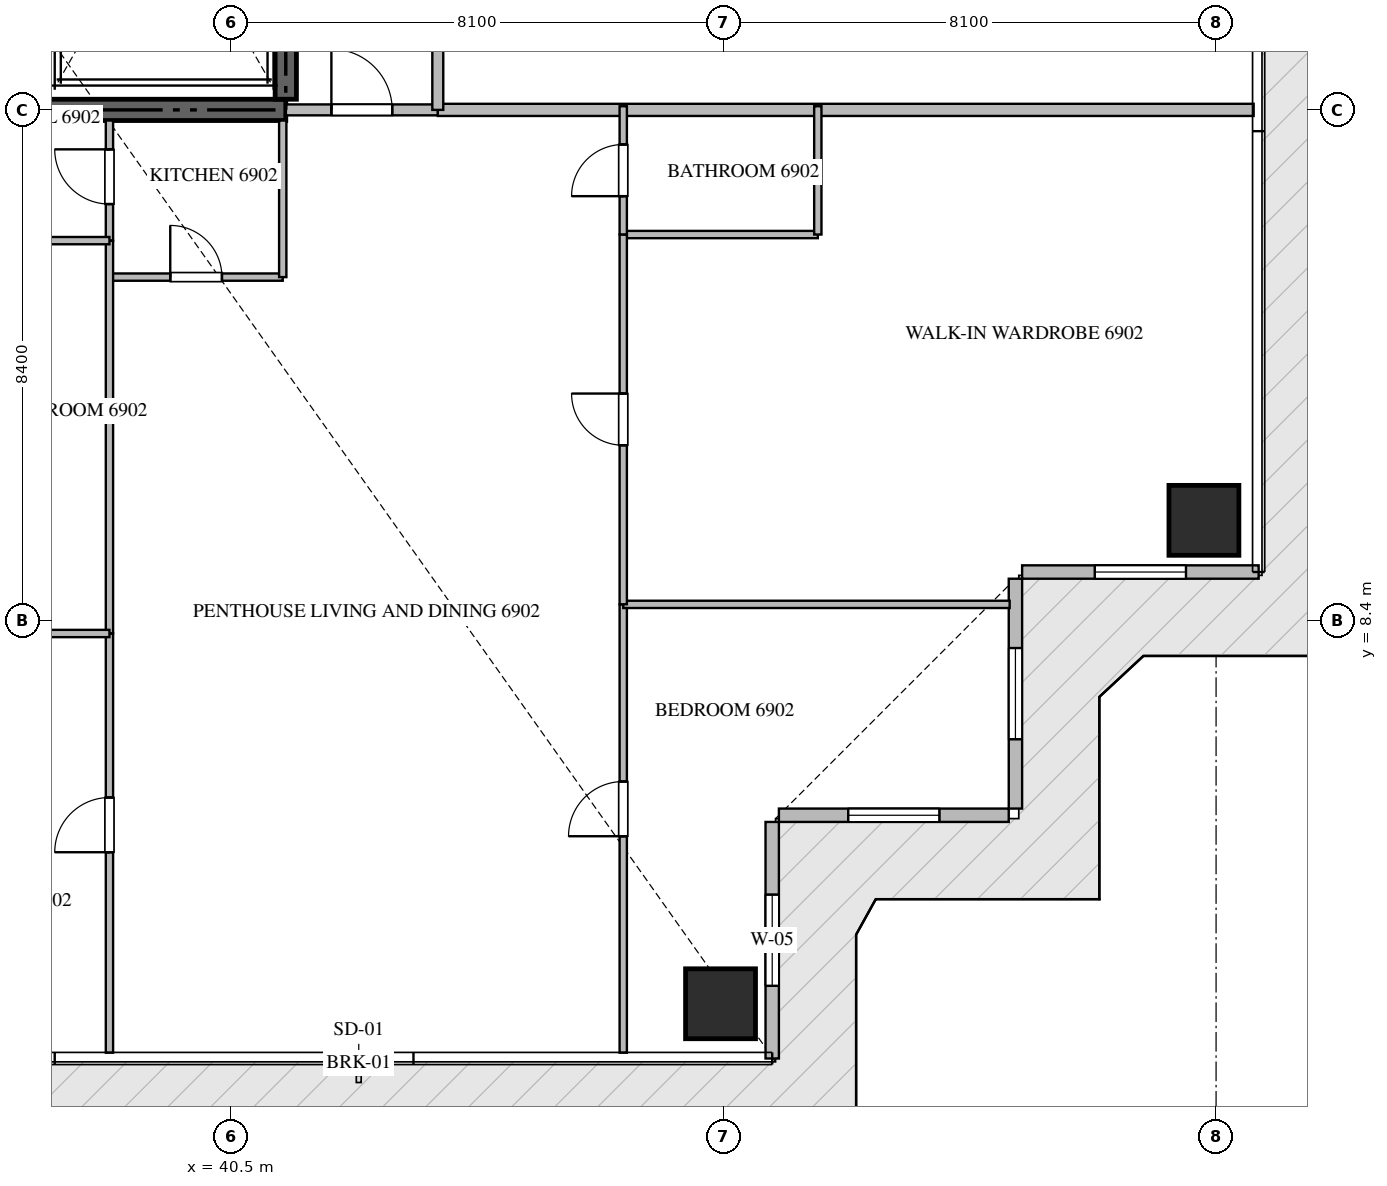
"""IFC4 building model, lengths in metres.
Left out: names, types, materials, properties, quantities, classifications, styles, units other than length and angle.
Written with IfcOpenShell. Run it as: python <this file> out.ifc"""

import sys

from ifc_helpers import new_model, si_unit, direction, frame, frame_2d, origin, origin_2d, place, context, subcontext, project, spatial, rectangle, extrude, source, transform, mapped, element, fill, save


model = new_model("IFC4")
c1 = context("Model", 3, precision=1e-05, world=origin(), true_north=direction((0.0, 1.0)))
c2 = subcontext(c1, "Body", "Model", "MODEL_VIEW")
j1 = project(units=[si_unit("LENGTHUNIT", "METRE"), si_unit("PLANEANGLEUNIT", "RADIAN")], contexts=[c1])
p1 = place(None, origin())
s1 = spatial("IfcSite", under=j1, at=p1, CompositionType="ELEMENT")
p2 = place(p1, origin())
s2 = spatial("IfcBuilding", under=s1, at=p2, CompositionType="ELEMENT")
p3 = place(p2, frame((0.0, 0.0, 275.9)))
s3 = spatial("IfcBuildingStorey", under=s2, at=p3, CompositionType="ELEMENT", Elevation=275.9)
p4 = place(p3, frame((23.4, 16.8, -0.26), z_axis=(0.0, 0.0, 1.0), x_axis=(1.0, 0.0, 0.0)))
e1 = element("IfcWall", 1, at=p4, inside=s3, PredefinedType="SHEAR", context=c2, shape_type="SweptSolid", body=[
    extrude(rectangle(XDim=18.0, YDim=0.35, at=frame_2d((9.0, 0.0))), origin(), (0.0, 0.0, 1.0), 3.848),
])
p5 = place(p3, frame((41.4, 16.975, -0.26), z_axis=(0.0, 0.0, 1.0), x_axis=(0.0, 1.0, 0.0)))
e2 = element("IfcWall", 2, at=p5, inside=s3, PredefinedType="SHEAR", context=c2, shape_type="SweptSolid", body=[
    extrude(rectangle(XDim=8.375, YDim=0.35, at=frame_2d((4.188, 0.0))), origin(), (0.0, 0.0, 1.0), 3.848),
])
m1 = source(origin(), c2, "Body", "SweptSolid", [
    extrude(rectangle(XDim=1.15, YDim=1.15, at=origin_2d()), origin(), (0.0, 0.0, 1.0), 3.85),
])
for number, where, z_axis, x_axis in (
    (3, (48.55, 2.1, -0.26), (0.0, 0.0, 1.0), (1.0, 0.0, 0.0)),
    (4, (56.5, 10.05, -0.26), (0.0, 0.0, 1.0), (1.0, 0.0, 0.0)),
):
    element("IfcColumn", number, at=place(p3, frame(where, z_axis=z_axis, x_axis=x_axis)), inside=s3, PredefinedType="COLUMN", context=c2, shape_type="MappedRepresentation", body=[
        mapped(m1, transform((0.0, 0.0, 0.0), scale=1.0)),
    ])
p6 = place(p3, frame((49.4, 1.2, 0.0), z_axis=(0.0, 0.0, 1.0), x_axis=(0.0, 1.0, 0.0)))
e5 = element("IfcWall", 5, at=p6, inside=s3, PredefinedType="ELEMENTEDWALL", context=c2, shape_type="SweptSolid", body=[
    extrude(rectangle(XDim=3.89, YDim=0.22, at=frame_2d((1.945, 0.0))), origin(), (0.0, 0.0, 1.0), 3.575),
])
p7 = place(p6, frame((1.195, 0.0, 0.65)))
e6 = element("IfcOpeningElement", 6, at=p7, cuts=e5, PredefinedType="OPENING", context=c2, shape_type="SweptSolid", body=[
    extrude(rectangle(XDim=1.5, YDim=2.25, at=frame_2d((0.75, 1.125))), frame((0.0, 0.12, 0.0), z_axis=(0.0, -1.0, 0.0), x_axis=(1.0, 0.0, 0.0)), (0.0, 0.0, 1.0), 0.24),
])
p8 = place(p3, frame((49.51, 5.2, 0.0), z_axis=(0.0, 0.0, 1.0), x_axis=(1.0, 0.0, 0.0)))
e7 = element("IfcWall", 7, at=p8, inside=s3, PredefinedType="ELEMENTEDWALL", context=c2, shape_type="SweptSolid", body=[
    extrude(rectangle(XDim=3.78, YDim=0.22, at=frame_2d((1.89, 0.0))), origin(), (0.0, 0.0, 1.0), 3.575),
])
p9 = place(p8, frame((1.14, 0.0, 0.65)))
e8 = element("IfcOpeningElement", 8, at=p9, cuts=e7, PredefinedType="OPENING", context=c2, shape_type="SweptSolid", body=[
    extrude(rectangle(XDim=1.5, YDim=2.25, at=frame_2d((0.75, 1.125))), frame((0.0, 0.12, 0.0), z_axis=(0.0, -1.0, 0.0), x_axis=(1.0, 0.0, 0.0)), (0.0, 0.0, 1.0), 0.24),
])
p10 = place(p3, frame((53.4, 5.31, 0.0), z_axis=(0.0, 0.0, 1.0), x_axis=(0.0, 1.0, 0.0)))
e9 = element("IfcWall", 9, at=p10, inside=s3, PredefinedType="ELEMENTEDWALL", context=c2, shape_type="SweptSolid", body=[
    extrude(rectangle(XDim=3.78, YDim=0.22, at=frame_2d((1.89, 0.0))), origin(), (0.0, 0.0, 1.0), 3.575),
])
p11 = place(p10, frame((1.14, 0.0, 0.65)))
e10 = element("IfcOpeningElement", 10, at=p11, cuts=e9, PredefinedType="OPENING", context=c2, shape_type="SweptSolid", body=[
    extrude(rectangle(XDim=1.5, YDim=2.25, at=frame_2d((0.75, 1.125))), frame((0.0, 0.12, 0.0), z_axis=(0.0, -1.0, 0.0), x_axis=(1.0, 0.0, 0.0)), (0.0, 0.0, 1.0), 0.24),
])
p12 = place(p3, frame((53.51, 9.2, 0.0), z_axis=(0.0, 0.0, 1.0), x_axis=(1.0, 0.0, 0.0)))
e11 = element("IfcWall", 11, at=p12, inside=s3, PredefinedType="ELEMENTEDWALL", context=c2, shape_type="SweptSolid", body=[
    extrude(rectangle(XDim=3.89, YDim=0.22, at=frame_2d((1.945, 0.0))), origin(), (0.0, 0.0, 1.0), 3.575),
])
p13 = place(p12, frame((1.195, 0.0, 0.65)))
e12 = element("IfcOpeningElement", 12, at=p13, cuts=e11, PredefinedType="OPENING", context=c2, shape_type="SweptSolid", body=[
    extrude(rectangle(XDim=1.5, YDim=2.25, at=frame_2d((0.75, 1.125))), frame((0.0, 0.12, 0.0), z_axis=(0.0, -1.0, 0.0), x_axis=(1.0, 0.0, 0.0)), (0.0, 0.0, 1.0), 0.24),
])
p14 = place(p3, frame((43.9, 16.8, 0.0), z_axis=(0.0, 0.0, 1.0), x_axis=(1.0, 0.0, 0.0)))
e13 = element("IfcWall", 13, at=p14, inside=s3, PredefinedType="PARTITIONING", context=c2, shape_type="SweptSolid", body=[
    extrude(rectangle(XDim=13.418, YDim=0.2, at=frame_2d((6.709, 0.0))), origin(), (0.0, 0.0, 1.0), 3.59),
])
p15 = place(p3, frame((41.402, 16.8, 0.0), z_axis=(0.0, 0.0, 1.0), x_axis=(1.0, 0.0, 0.0)))
e14 = element("IfcWall", 14, at=p15, inside=s3, PredefinedType="PARTITIONING", context=c2, shape_type="SweptSolid", body=[
    extrude(rectangle(XDim=2.496, YDim=0.18, at=frame_2d((1.248, 0.0))), origin(), (0.0, 0.0, 1.0), 3.59),
])
p16 = place(p15, frame((0.748, 0.0, 0.0)))
e15 = element("IfcOpeningElement", 15, at=p16, cuts=e14, PredefinedType="OPENING", context=c2, shape_type="SweptSolid", body=[
    extrude(rectangle(XDim=1.0, YDim=2.15, at=frame_2d((0.5, 1.075))), frame((0.0, 0.1, 0.0), z_axis=(0.0, -1.0, 0.0), x_axis=(1.0, 0.0, 0.0)), (0.0, 0.0, 1.0), 0.2),
])
p17 = place(p3, frame((43.9, 16.8, 0.0), z_axis=(0.0, 0.0, 1.0), x_axis=(0.0, 1.0, 0.0)))
e16 = element("IfcWall", 16, at=p17, inside=s3, PredefinedType="PARTITIONING", context=c2, shape_type="SweptSolid", body=[
    extrude(rectangle(XDim=16.8, YDim=0.18, at=frame_2d((8.4, 0.0))), origin(), (0.0, 0.0, 1.0), 3.59),
])
p18 = place(p17, frame((1.3, 0.0, 0.0)))
e17 = element("IfcOpeningElement", 17, at=p18, cuts=e16, PredefinedType="OPENING", context=c2, shape_type="SweptSolid", body=[
    extrude(rectangle(XDim=1.0, YDim=2.15, at=frame_2d((0.5, 1.075))), frame((0.0, 0.1, 0.0), z_axis=(0.0, -1.0, 0.0), x_axis=(1.0, 0.0, 0.0)), (0.0, 0.0, 1.0), 0.2),
])
p19 = place(p3, frame((38.5, 14.05, 0.0), z_axis=(0.0, 0.0, 1.0), x_axis=(1.0, 0.0, 0.0)))
e18 = element("IfcWall", 18, at=p19, inside=s3, PredefinedType="PARTITIONING", context=c2, shape_type="SweptSolid", body=[
    extrude(rectangle(XDim=2.85, YDim=0.12, at=frame_2d((1.425, 0.0))), origin(), (0.0, 0.0, 1.0), 3.59),
])
p20 = place(p19, frame((1.0, 0.0, 0.0)))
e19 = element("IfcOpeningElement", 19, at=p20, cuts=e18, PredefinedType="OPENING", context=c2, shape_type="SweptSolid", body=[
    extrude(rectangle(XDim=0.85, YDim=2.1, at=frame_2d((0.425, 1.05))), frame((0.0, 0.07, 0.0), z_axis=(0.0, -1.0, 0.0), x_axis=(1.0, 0.0, 0.0)), (0.0, 0.0, 1.0), 0.14),
])
p21 = place(p3, frame((41.35, 14.05, 0.0), z_axis=(0.0, 0.0, 1.0), x_axis=(0.0, 1.0, 0.0)))
e20 = element("IfcWall", 20, at=p21, inside=s3, PredefinedType="PARTITIONING", context=c2, shape_type="SweptSolid", body=[
    extrude(rectangle(XDim=2.575, YDim=0.12, at=frame_2d((1.288, 0.0))), origin(), (0.0, 0.0, 1.0), 3.59),
])
p22 = place(p3, frame((38.5, 14.65, 0.0), z_axis=(0.0, 0.0, 1.0), x_axis=(0.0, 1.0, 0.0)))
e21 = element("IfcWall", 21, at=p22, inside=s3, PredefinedType="PARTITIONING", context=c2, shape_type="SweptSolid", body=[
    extrude(rectangle(XDim=1.975, YDim=0.12, at=frame_2d((0.988, 0.0))), origin(), (0.0, 0.0, 1.0), 3.59),
])
p23 = place(p22, frame((0.601, 0.0, 0.0)))
e22 = element("IfcOpeningElement", 22, at=p23, cuts=e21, PredefinedType="OPENING", context=c2, shape_type="SweptSolid", body=[
    extrude(rectangle(XDim=0.9, YDim=2.1, at=frame_2d((0.45, 1.05))), frame((0.0, 0.07, 0.0), z_axis=(0.0, -1.0, 0.0), x_axis=(1.0, 0.0, 0.0)), (0.0, 0.0, 1.0), 0.14),
])
p24 = place(p3, frame((38.5, 1.295, 0.0), z_axis=(0.0, 0.0, 1.0), x_axis=(0.0, 1.0, 0.0)))
e23 = element("IfcWall", 23, at=p24, inside=s3, PredefinedType="PARTITIONING", context=c2, shape_type="SweptSolid", body=[
    extrude(rectangle(XDim=6.894, YDim=0.12, at=frame_2d((3.447, 0.0))), origin(), (0.0, 0.0, 1.0), 3.59),
])
p25 = place(p24, frame((3.297, 0.0, 0.0)))
e24 = element("IfcOpeningElement", 24, at=p25, cuts=e23, PredefinedType="OPENING", context=c2, shape_type="SweptSolid", body=[
    extrude(rectangle(XDim=0.9, YDim=2.1, at=frame_2d((0.45, 1.05))), frame((0.0, 0.07, 0.0), z_axis=(0.0, -1.0, 0.0), x_axis=(1.0, 0.0, 0.0)), (0.0, 0.0, 1.0), 0.14),
])
p26 = place(p3, frame((38.5, 8.191, 0.0), z_axis=(0.0, 0.0, 1.0), x_axis=(0.0, 1.0, 0.0)))
e25 = element("IfcWall", 25, at=p26, inside=s3, PredefinedType="PARTITIONING", context=c2, shape_type="SweptSolid", body=[
    extrude(rectangle(XDim=6.457, YDim=0.12, at=frame_2d((3.229, 0.0))), origin(), (0.0, 0.0, 1.0), 3.59),
])
p27 = place(p3, frame((33.38, 8.189, 0.0), z_axis=(0.0, 0.0, 1.0), x_axis=(1.0, 0.0, 0.0)))
e26 = element("IfcWall", 26, at=p27, inside=s3, PredefinedType="PARTITIONING", context=c2, shape_type="SweptSolid", body=[
    extrude(rectangle(XDim=5.12, YDim=0.12, at=frame_2d((2.56, 0.0))), origin(), (0.0, 0.0, 1.0), 3.59),
])
p28 = place(p3, frame((35.482, 14.65, 0.0), z_axis=(0.0, 0.0, 1.0), x_axis=(1.0, 0.0, 0.0)))
e27 = element("IfcWall", 27, at=p28, inside=s3, PredefinedType="PARTITIONING", context=c2, shape_type="SweptSolid", body=[
    extrude(rectangle(XDim=3.018, YDim=0.12, at=frame_2d((1.509, 0.0))), origin(), (0.0, 0.0, 1.0), 3.59),
])
p29 = place(p28, frame((1.084, 0.0, 0.0)))
e28 = element("IfcOpeningElement", 28, at=p29, cuts=e27, PredefinedType="OPENING", context=c2, shape_type="SweptSolid", body=[
    extrude(rectangle(XDim=0.85, YDim=2.1, at=frame_2d((0.425, 1.05))), frame((0.0, 0.07, 0.0), z_axis=(0.0, -1.0, 0.0), x_axis=(1.0, 0.0, 0.0)), (0.0, 0.0, 1.0), 0.14),
])
p30 = place(p3, frame((46.95, 1.295, 0.0), z_axis=(0.0, 0.0, 1.0), x_axis=(0.0, 1.0, 0.0)))
e29 = element("IfcWall", 29, at=p30, inside=s3, PredefinedType="PARTITIONING", context=c2, shape_type="SweptSolid", body=[
    extrude(rectangle(XDim=7.373, YDim=0.12, at=frame_2d((3.687, 0.0))), origin(), (0.0, 0.0, 1.0), 3.59),
])
p31 = place(p30, frame((3.56, 0.0, 0.0)))
e30 = element("IfcOpeningElement", 30, at=p31, cuts=e29, PredefinedType="OPENING", context=c2, shape_type="SweptSolid", body=[
    extrude(rectangle(XDim=0.9, YDim=2.1, at=frame_2d((0.45, 1.05))), frame((0.0, 0.07, 0.0), z_axis=(0.0, -1.0, 0.0), x_axis=(1.0, 0.0, 0.0)), (0.0, 0.0, 1.0), 0.14),
])
p32 = place(p3, frame((46.95, 8.668, 0.0), z_axis=(0.0, 0.0, 1.0), x_axis=(1.0, 0.0, 0.0)))
e31 = element("IfcWall", 31, at=p32, inside=s3, PredefinedType="PARTITIONING", context=c2, shape_type="SweptSolid", body=[
    extrude(rectangle(XDim=6.355, YDim=0.12, at=frame_2d((3.177, 0.0))), origin(), (0.0, 0.0, 1.0), 3.59),
])
p33 = place(p3, frame((46.95, 14.75, 0.0), z_axis=(0.0, 0.0, 1.0), x_axis=(1.0, 0.0, 0.0)))
e32 = element("IfcWall", 32, at=p33, inside=s3, PredefinedType="PARTITIONING", context=c2, shape_type="SweptSolid", body=[
    extrude(rectangle(XDim=3.2, YDim=0.12, at=frame_2d((1.6, 0.0))), origin(), (0.0, 0.0, 1.0), 3.59),
])
p34 = place(p3, frame((50.15, 14.75, 0.0), z_axis=(0.0, 0.0, 1.0), x_axis=(0.0, 1.0, 0.0)))
e33 = element("IfcWall", 33, at=p34, inside=s3, PredefinedType="PARTITIONING", context=c2, shape_type="SweptSolid", body=[
    extrude(rectangle(XDim=2.11, YDim=0.12, at=frame_2d((1.055, 0.0))), origin(), (0.0, 0.0, 1.0), 3.59),
])
p35 = place(p3, frame((46.95, 8.67, 0.0), z_axis=(0.0, 0.0, 1.0), x_axis=(0.0, 1.0, 0.0)))
e34 = element("IfcWall", 34, at=p35, inside=s3, PredefinedType="PARTITIONING", context=c2, shape_type="SweptSolid", body=[
    extrude(rectangle(XDim=6.08, YDim=0.12, at=frame_2d((3.04, 0.0))), origin(), (0.0, 0.0, 1.0), 3.59),
])
p36 = place(p35, frame((2.615, 0.0, 0.0)))
e35 = element("IfcOpeningElement", 35, at=p36, cuts=e34, PredefinedType="OPENING", context=c2, shape_type="SweptSolid", body=[
    extrude(rectangle(XDim=0.85, YDim=2.1, at=frame_2d((0.425, 1.05))), frame((0.0, 0.07, 0.0), z_axis=(0.0, -1.0, 0.0), x_axis=(1.0, 0.0, 0.0)), (0.0, 0.0, 1.0), 0.14),
])
p37 = place(p3, frame((46.95, 14.752, 0.0), z_axis=(0.0, 0.0, 1.0), x_axis=(0.0, 1.0, 0.0)))
e36 = element("IfcWall", 36, at=p37, inside=s3, PredefinedType="PARTITIONING", context=c2, shape_type="SweptSolid", body=[
    extrude(rectangle(XDim=2.108, YDim=0.12, at=frame_2d((1.054, 0.0))), origin(), (0.0, 0.0, 1.0), 3.59),
])
p38 = place(p37, frame((0.629, 0.0, 0.0)))
e37 = element("IfcOpeningElement", 37, at=p38, cuts=e36, PredefinedType="OPENING", context=c2, shape_type="SweptSolid", body=[
    extrude(rectangle(XDim=0.85, YDim=2.1, at=frame_2d((0.425, 1.05))), frame((0.0, 0.07, 0.0), z_axis=(0.0, -1.0, 0.0), x_axis=(1.0, 0.0, 0.0)), (0.0, 0.0, 1.0), 0.14),
])
m2 = source(origin(), c2, "Body", "SweptSolid", [
    extrude(rectangle(XDim=1.5, YDim=2.25, at=frame_2d((0.75, 1.125))), frame((0.0, 0.03, 0.0), z_axis=(0.0, -1.0, 0.0), x_axis=(1.0, 0.0, 0.0)), (0.0, 0.0, 1.0), 0.06),
])
p39 = place(p7, origin())
e38 = element("IfcWindow", 38, at=p39, inside=s3, PartitioningType="SINGLE_PANEL", PredefinedType="WINDOW", context=c2, shape_type="MappedRepresentation", body=[
    mapped(m2, transform((0.0, 0.0, 0.0), scale=1.0)),
])
fill(e6, e38)
p40 = place(p9, origin())
e39 = element("IfcWindow", 39, at=p40, inside=s3, PartitioningType="SINGLE_PANEL", PredefinedType="WINDOW", context=c2, shape_type="MappedRepresentation", body=[
    mapped(m2, transform((0.0, 0.0, 0.0), scale=1.0)),
])
fill(e8, e39)
p41 = place(p11, origin())
e40 = element("IfcWindow", 40, at=p41, inside=s3, PartitioningType="SINGLE_PANEL", PredefinedType="WINDOW", context=c2, shape_type="MappedRepresentation", body=[
    mapped(m2, transform((0.0, 0.0, 0.0), scale=1.0)),
])
fill(e10, e40)
p42 = place(p13, origin())
e41 = element("IfcWindow", 41, at=p42, inside=s3, PartitioningType="SINGLE_PANEL", PredefinedType="WINDOW", context=c2, shape_type="MappedRepresentation", body=[
    mapped(m2, transform((0.0, 0.0, 0.0), scale=1.0)),
])
fill(e12, e41)
m3 = source(origin(), c2, "Body", "SweptSolid", [
    extrude(rectangle(XDim=1.0, YDim=2.15, at=frame_2d((0.5, 1.075))), frame((0.0, 0.025, 0.0), z_axis=(0.0, -1.0, 0.0), x_axis=(1.0, 0.0, 0.0)), (0.0, 0.0, 1.0), 0.05),
])
p43 = place(p16, origin())
e42 = element("IfcDoor", 42, at=p43, inside=s3, OperationType="SINGLE_SWING_LEFT", PredefinedType="DOOR", context=c2, shape_type="MappedRepresentation", body=[
    mapped(m3, transform((0.0, 0.0, 0.0), scale=1.0)),
])
fill(e15, e42)
m4 = source(origin(), c2, "Body", "SweptSolid", [
    extrude(rectangle(XDim=0.85, YDim=2.1, at=frame_2d((0.425, 1.05))), frame((0.0, 0.025, 0.0), z_axis=(0.0, -1.0, 0.0), x_axis=(1.0, 0.0, 0.0)), (0.0, 0.0, 1.0), 0.05),
])
p44 = place(p20, origin())
e43 = element("IfcDoor", 43, at=p44, inside=s3, OperationType="SINGLE_SWING_LEFT", PredefinedType="DOOR", context=c2, shape_type="MappedRepresentation", body=[
    mapped(m4, transform((0.0, 0.0, 0.0), scale=1.0)),
])
fill(e19, e43)
m5 = source(origin(), c2, "Body", "SweptSolid", [
    extrude(rectangle(XDim=0.9, YDim=2.1, at=frame_2d((0.45, 1.05))), frame((0.0, 0.025, 0.0), z_axis=(0.0, -1.0, 0.0), x_axis=(1.0, 0.0, 0.0)), (0.0, 0.0, 1.0), 0.05),
])
p45 = place(p23, origin())
e44 = element("IfcDoor", 44, at=p45, inside=s3, OperationType="SINGLE_SWING_RIGHT", PredefinedType="DOOR", context=c2, shape_type="MappedRepresentation", body=[
    mapped(m5, transform((0.0, 0.0, 0.0), scale=1.0)),
])
fill(e22, e44)
p46 = place(p25, origin())
e45 = element("IfcDoor", 45, at=p46, inside=s3, OperationType="SINGLE_SWING_LEFT", PredefinedType="DOOR", context=c2, shape_type="MappedRepresentation", body=[
    mapped(m5, transform((0.0, 0.0, 0.0), scale=1.0)),
])
fill(e24, e45)
p47 = place(p31, origin())
e46 = element("IfcDoor", 46, at=p47, inside=s3, OperationType="SINGLE_SWING_LEFT", PredefinedType="DOOR", context=c2, shape_type="MappedRepresentation", body=[
    mapped(m5, transform((0.0, 0.0, 0.0), scale=1.0)),
])
fill(e30, e46)
p48 = place(p36, origin())
e47 = element("IfcDoor", 47, at=p48, inside=s3, OperationType="SINGLE_SWING_RIGHT", PredefinedType="DOOR", context=c2, shape_type="MappedRepresentation", body=[
    mapped(m4, transform((0.0, 0.0, 0.0), scale=1.0)),
])
fill(e35, e47)
p49 = place(p38, origin())
e48 = element("IfcDoor", 48, at=p49, inside=s3, OperationType="SINGLE_SWING_LEFT", PredefinedType="DOOR", context=c2, shape_type="MappedRepresentation", body=[
    mapped(m4, transform((0.0, 0.0, 0.0), scale=1.0)),
])
fill(e37, e48)
save(model, sys.argv[1])
